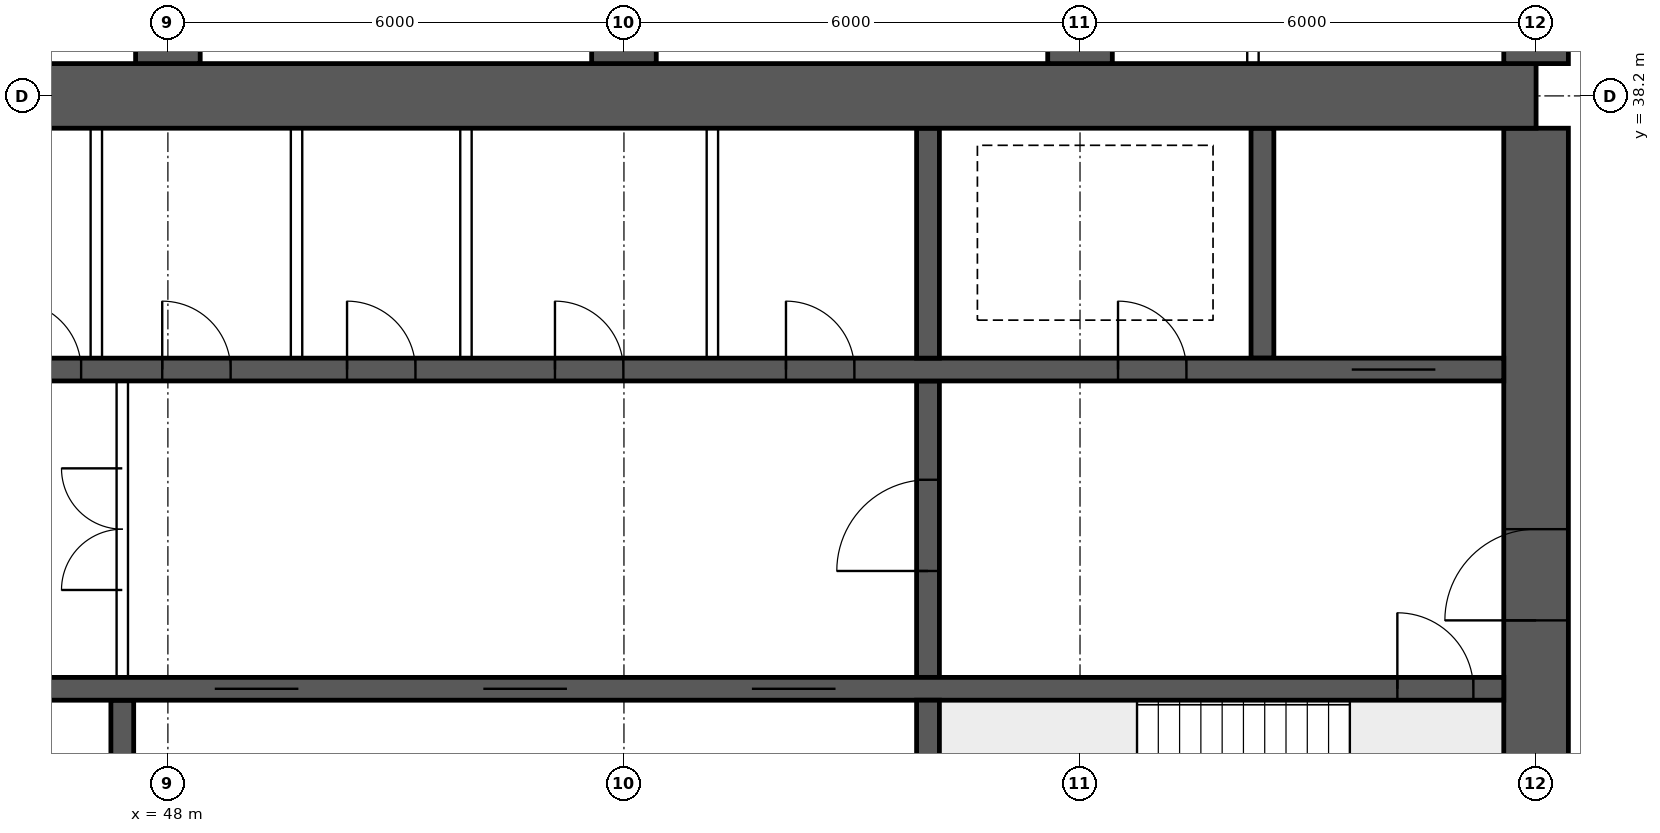
"""IFC4 building model, lengths in metres.
Left out: names, types, materials, properties, quantities, classifications, styles, units other than length and angle.
Written with IfcOpenShell. Run it as: python <this file> out.ifc"""

import sys

from ifc_helpers import new_model, si_unit, direction, frame, frame_2d, origin, place, context, subcontext, project, spatial, rectangle, extrude, element, fill, save


model = new_model("IFC4")
c1 = context("Model", 3, precision=1e-05, world=origin(), true_north=direction((0.0, 1.0)))
c2 = subcontext(c1, "Body", "Model", "MODEL_VIEW")
j1 = project(units=[si_unit("LENGTHUNIT", "METRE"), si_unit("PLANEANGLEUNIT", "RADIAN")], contexts=[c1])
p1 = place(None, origin())
s1 = spatial("IfcSite", under=j1, at=p1, CompositionType="ELEMENT")
p2 = place(p1, origin())
s2 = spatial("IfcBuilding", under=s1, at=p2, CompositionType="ELEMENT")
p3 = place(p2, frame((0.0, 0.0, 171.1)))
s3 = spatial("IfcBuildingStorey", under=s2, at=p3, CompositionType="ELEMENT", Elevation=171.1)
p4 = place(p3, frame((18.0, 38.2, 0.0), z_axis=(0.0, 0.0, 1.0), x_axis=(1.0, 0.0, 0.0)))
e1 = element("IfcWall", 1, at=p4, inside=s3, PredefinedType="SHEAR", context=c2, shape_type="SweptSolid", body=[
    extrude(rectangle(XDim=48.0, YDim=0.85, at=frame_2d((24.0, 0.0))), origin(), (0.0, 0.0, 1.0), 3.75),
])
p5 = place(p3, frame((66.0, 26.225, 0.0), z_axis=(0.0, 0.0, 1.0), x_axis=(0.0, 1.0, 0.0)))
e2 = element("IfcWall", 2, at=p5, inside=s3, PredefinedType="SHEAR", context=c2, shape_type="SweptSolid", body=[
    extrude(rectangle(XDim=11.55, YDim=0.85, at=frame_2d((5.775, 0.0))), origin(), (0.0, 0.0, 1.0), 3.75),
])
p6 = place(p5, frame((5.075, 0.0, 0.0)))
e3 = element("IfcOpeningElement", 3, at=p6, cuts=e2, PredefinedType="OPENING", context=c2, shape_type="SweptSolid", body=[
    extrude(rectangle(XDim=1.2, YDim=2.1, at=frame_2d((0.6, 1.05))), frame((0.0, 0.435, 0.0), z_axis=(0.0, -1.0, 0.0), x_axis=(1.0, 0.0, 0.0)), (0.0, 0.0, 1.0), 0.87),
])
p7 = place(p3, frame((18.425, 30.4, 0.0), z_axis=(0.0, 0.0, 1.0), x_axis=(1.0, 0.0, 0.0)))
e4 = element("IfcWall", 4, at=p7, inside=s3, PredefinedType="SHEAR", context=c2, shape_type="SweptSolid", body=[
    extrude(rectangle(XDim=47.15, YDim=0.3, at=frame_2d((23.575, 0.0))), origin(), (0.0, 0.0, 1.0), 3.75),
])
p8 = place(p7, frame((0.4, 0.0, 0.0)))
e5 = element("IfcOpeningElement", 5, at=p8, cuts=e4, PredefinedType="OPENING", context=c2, shape_type="SweptSolid", body=[
    extrude(rectangle(XDim=1.0, YDim=2.1, at=frame_2d((0.5, 1.05))), frame((0.0, 0.16, 0.0), z_axis=(0.0, -1.0, 0.0), x_axis=(1.0, 0.0, 0.0)), (0.0, 0.0, 1.0), 0.32),
])
p9 = place(p7, frame((45.75, 0.0, 0.0)))
e6 = element("IfcOpeningElement", 6, at=p9, cuts=e4, PredefinedType="OPENING", context=c2, shape_type="SweptSolid", body=[
    extrude(rectangle(XDim=1.0, YDim=2.1, at=frame_2d((0.5, 1.05))), frame((0.0, 0.16, 0.0), z_axis=(0.0, -1.0, 0.0), x_axis=(1.0, 0.0, 0.0)), (0.0, 0.0, 1.0), 0.32),
])
p10 = place(p7, frame((8.325, 0.0, 0.0)))
e7 = element("IfcOpeningElement", 7, at=p10, cuts=e4, PredefinedType="OPENING", context=c2, shape_type="SweptSolid", body=[
    extrude(rectangle(XDim=1.1, YDim=2.1, at=frame_2d((0.55, 1.05))), frame((0.0, 0.16, 0.0), z_axis=(0.0, -1.0, 0.0), x_axis=(1.0, 0.0, 0.0)), (0.0, 0.0, 1.0), 0.32),
])
p11 = place(p7, frame((10.925, 0.0, 0.0)))
e8 = element("IfcOpeningElement", 8, at=p11, cuts=e4, PredefinedType="OPENING", context=c2, shape_type="SweptSolid", body=[
    extrude(rectangle(XDim=1.1, YDim=2.1, at=frame_2d((0.55, 1.05))), frame((0.0, 0.16, 0.0), z_axis=(0.0, -1.0, 0.0), x_axis=(1.0, 0.0, 0.0)), (0.0, 0.0, 1.0), 0.32),
])
p12 = place(p7, frame((13.525, 0.0, 0.0)))
e9 = element("IfcOpeningElement", 9, at=p12, cuts=e4, PredefinedType="OPENING", context=c2, shape_type="SweptSolid", body=[
    extrude(rectangle(XDim=1.1, YDim=2.1, at=frame_2d((0.55, 1.05))), frame((0.0, 0.16, 0.0), z_axis=(0.0, -1.0, 0.0), x_axis=(1.0, 0.0, 0.0)), (0.0, 0.0, 1.0), 0.32),
])
p13 = place(p7, frame((16.125, 0.0, 0.0)))
e10 = element("IfcOpeningElement", 10, at=p13, cuts=e4, PredefinedType="OPENING", context=c2, shape_type="SweptSolid", body=[
    extrude(rectangle(XDim=1.1, YDim=2.1, at=frame_2d((0.55, 1.05))), frame((0.0, 0.16, 0.0), z_axis=(0.0, -1.0, 0.0), x_axis=(1.0, 0.0, 0.0)), (0.0, 0.0, 1.0), 0.32),
])
p14 = place(p7, frame((18.9, 0.0, 0.0)))
e11 = element("IfcOpeningElement", 11, at=p14, cuts=e4, PredefinedType="OPENING", context=c2, shape_type="SweptSolid", body=[
    extrude(rectangle(XDim=0.9, YDim=2.1, at=frame_2d((0.45, 1.05))), frame((0.0, 0.16, 0.0), z_axis=(0.0, -1.0, 0.0), x_axis=(1.0, 0.0, 0.0)), (0.0, 0.0, 1.0), 0.32),
])
p15 = place(p7, frame((30.192, 0.0, 0.0)))
e12 = element("IfcOpeningElement", 12, at=p15, cuts=e4, PredefinedType="OPENING", context=c2, shape_type="SweptSolid", body=[
    extrude(rectangle(XDim=1.1, YDim=2.1, at=frame_2d((0.55, 1.05))), frame((0.0, 0.16, 0.0), z_axis=(0.0, -1.0, 0.0), x_axis=(1.0, 0.0, 0.0)), (0.0, 0.0, 1.0), 0.32),
])
p16 = place(p7, frame((33.725, 0.0, 0.0)))
e13 = element("IfcOpeningElement", 13, at=p16, cuts=e4, PredefinedType="OPENING", context=c2, shape_type="SweptSolid", body=[
    extrude(rectangle(XDim=1.1, YDim=2.1, at=frame_2d((0.55, 1.05))), frame((0.0, 0.16, 0.0), z_axis=(0.0, -1.0, 0.0), x_axis=(1.0, 0.0, 0.0)), (0.0, 0.0, 1.0), 0.32),
])
p17 = place(p7, frame((37.258, 0.0, 0.0)))
e14 = element("IfcOpeningElement", 14, at=p17, cuts=e4, PredefinedType="OPENING", context=c2, shape_type="SweptSolid", body=[
    extrude(rectangle(XDim=1.1, YDim=2.1, at=frame_2d((0.55, 1.05))), frame((0.0, 0.16, 0.0), z_axis=(0.0, -1.0, 0.0), x_axis=(1.0, 0.0, 0.0)), (0.0, 0.0, 1.0), 0.32),
])
p18 = place(p3, frame((18.425, 34.6, 0.0), z_axis=(0.0, 0.0, 1.0), x_axis=(1.0, 0.0, 0.0)))
e15 = element("IfcWall", 15, at=p18, inside=s3, PredefinedType="SHEAR", context=c2, shape_type="SweptSolid", body=[
    extrude(rectangle(XDim=47.15, YDim=0.3, at=frame_2d((23.575, 0.0))), origin(), (0.0, 0.0, 1.0), 3.75),
])
p19 = place(p18, frame((0.9, 0.0, 0.0)))
e16 = element("IfcOpeningElement", 16, at=p19, cuts=e15, PredefinedType="OPENING", context=c2, shape_type="SweptSolid", body=[
    extrude(rectangle(XDim=1.1, YDim=2.1, at=frame_2d((0.55, 1.05))), frame((0.0, 0.16, 0.0), z_axis=(0.0, -1.0, 0.0), x_axis=(1.0, 0.0, 0.0)), (0.0, 0.0, 1.0), 0.32),
])
p20 = place(p18, frame((45.15, 0.0, 0.0)))
e17 = element("IfcOpeningElement", 17, at=p20, cuts=e15, PredefinedType="OPENING", context=c2, shape_type="SweptSolid", body=[
    extrude(rectangle(XDim=1.1, YDim=2.1, at=frame_2d((0.55, 1.05))), frame((0.0, 0.16, 0.0), z_axis=(0.0, -1.0, 0.0), x_axis=(1.0, 0.0, 0.0)), (0.0, 0.0, 1.0), 0.32),
])
p21 = place(p18, frame((4.175, 0.0, 0.0)))
e18 = element("IfcOpeningElement", 18, at=p21, cuts=e15, PredefinedType="OPENING", context=c2, shape_type="SweptSolid", body=[
    extrude(rectangle(XDim=0.9, YDim=2.1, at=frame_2d((0.45, 1.05))), frame((0.0, 0.16, 0.0), z_axis=(0.0, -1.0, 0.0), x_axis=(1.0, 0.0, 0.0)), (0.0, 0.0, 1.0), 0.32),
])
p22 = place(p18, frame((42.075, 0.0, 0.0)))
e19 = element("IfcOpeningElement", 19, at=p22, cuts=e15, PredefinedType="OPENING", context=c2, shape_type="SweptSolid", body=[
    extrude(rectangle(XDim=0.9, YDim=2.1, at=frame_2d((0.45, 1.05))), frame((0.0, 0.16, 0.0), z_axis=(0.0, -1.0, 0.0), x_axis=(1.0, 0.0, 0.0)), (0.0, 0.0, 1.0), 0.32),
])
p23 = place(p18, frame((8.95, 0.0, 0.0)))
e20 = element("IfcOpeningElement", 20, at=p23, cuts=e15, PredefinedType="OPENING", context=c2, shape_type="SweptSolid", body=[
    extrude(rectangle(XDim=0.9, YDim=2.1, at=frame_2d((0.45, 1.05))), frame((0.0, 0.16, 0.0), z_axis=(0.0, -1.0, 0.0), x_axis=(1.0, 0.0, 0.0)), (0.0, 0.0, 1.0), 0.32),
])
p24 = place(p18, frame((12.924, 0.0, 0.0)))
e21 = element("IfcOpeningElement", 21, at=p24, cuts=e15, PredefinedType="OPENING", context=c2, shape_type="SweptSolid", body=[
    extrude(rectangle(XDim=0.9, YDim=2.1, at=frame_2d((0.45, 1.05))), frame((0.0, 0.16, 0.0), z_axis=(0.0, -1.0, 0.0), x_axis=(1.0, 0.0, 0.0)), (0.0, 0.0, 1.0), 0.32),
])
p25 = place(p18, frame((16.571, 0.0, 0.0)))
e22 = element("IfcOpeningElement", 22, at=p25, cuts=e15, PredefinedType="OPENING", context=c2, shape_type="SweptSolid", body=[
    extrude(rectangle(XDim=0.9, YDim=2.1, at=frame_2d((0.45, 1.05))), frame((0.0, 0.16, 0.0), z_axis=(0.0, -1.0, 0.0), x_axis=(1.0, 0.0, 0.0)), (0.0, 0.0, 1.0), 0.32),
])
p26 = place(p18, frame((20.33, 0.0, 0.0)))
e23 = element("IfcOpeningElement", 23, at=p26, cuts=e15, PredefinedType="OPENING", context=c2, shape_type="SweptSolid", body=[
    extrude(rectangle(XDim=0.9, YDim=2.1, at=frame_2d((0.45, 1.05))), frame((0.0, 0.16, 0.0), z_axis=(0.0, -1.0, 0.0), x_axis=(1.0, 0.0, 0.0)), (0.0, 0.0, 1.0), 0.32),
])
p27 = place(p18, frame((24.736, 0.0, 0.0)))
e24 = element("IfcOpeningElement", 24, at=p27, cuts=e15, PredefinedType="OPENING", context=c2, shape_type="SweptSolid", body=[
    extrude(rectangle(XDim=0.9, YDim=2.1, at=frame_2d((0.45, 1.05))), frame((0.0, 0.16, 0.0), z_axis=(0.0, -1.0, 0.0), x_axis=(1.0, 0.0, 0.0)), (0.0, 0.0, 1.0), 0.32),
])
p28 = place(p18, frame((27.533, 0.0, 0.0)))
e25 = element("IfcOpeningElement", 25, at=p28, cuts=e15, PredefinedType="OPENING", context=c2, shape_type="SweptSolid", body=[
    extrude(rectangle(XDim=0.9, YDim=2.1, at=frame_2d((0.45, 1.05))), frame((0.0, 0.16, 0.0), z_axis=(0.0, -1.0, 0.0), x_axis=(1.0, 0.0, 0.0)), (0.0, 0.0, 1.0), 0.32),
])
p29 = place(p18, frame((29.5, 0.0, 0.0)))
e26 = element("IfcOpeningElement", 26, at=p29, cuts=e15, PredefinedType="OPENING", context=c2, shape_type="SweptSolid", body=[
    extrude(rectangle(XDim=0.9, YDim=2.1, at=frame_2d((0.45, 1.05))), frame((0.0, 0.16, 0.0), z_axis=(0.0, -1.0, 0.0), x_axis=(1.0, 0.0, 0.0)), (0.0, 0.0, 1.0), 0.32),
])
p30 = place(p18, frame((31.932, 0.0, 0.0)))
e27 = element("IfcOpeningElement", 27, at=p30, cuts=e15, PredefinedType="OPENING", context=c2, shape_type="SweptSolid", body=[
    extrude(rectangle(XDim=0.9, YDim=2.1, at=frame_2d((0.45, 1.05))), frame((0.0, 0.16, 0.0), z_axis=(0.0, -1.0, 0.0), x_axis=(1.0, 0.0, 0.0)), (0.0, 0.0, 1.0), 0.32),
])
p31 = place(p18, frame((34.667, 0.0, 0.0)))
e28 = element("IfcOpeningElement", 28, at=p31, cuts=e15, PredefinedType="OPENING", context=c2, shape_type="SweptSolid", body=[
    extrude(rectangle(XDim=0.9, YDim=2.1, at=frame_2d((0.45, 1.05))), frame((0.0, 0.16, 0.0), z_axis=(0.0, -1.0, 0.0), x_axis=(1.0, 0.0, 0.0)), (0.0, 0.0, 1.0), 0.32),
])
p32 = place(p18, frame((37.707, 0.0, 0.0)))
e29 = element("IfcOpeningElement", 29, at=p32, cuts=e15, PredefinedType="OPENING", context=c2, shape_type="SweptSolid", body=[
    extrude(rectangle(XDim=0.9, YDim=2.1, at=frame_2d((0.45, 1.05))), frame((0.0, 0.16, 0.0), z_axis=(0.0, -1.0, 0.0), x_axis=(1.0, 0.0, 0.0)), (0.0, 0.0, 1.0), 0.32),
])
p33 = place(p3, frame((58.0, 26.225, 0.0), z_axis=(0.0, 0.0, 1.0), x_axis=(0.0, 1.0, 0.0)))
e30 = element("IfcWall", 30, at=p33, inside=s3, PredefinedType="SHEAR", context=c2, shape_type="SweptSolid", body=[
    extrude(rectangle(XDim=4.025, YDim=0.3, at=frame_2d((2.012, 0.0))), origin(), (0.0, 0.0, 1.0), 3.75),
])
p34 = place(p3, frame((58.0, 30.55, 0.0), z_axis=(0.0, 0.0, 1.0), x_axis=(0.0, 1.0, 0.0)))
e31 = element("IfcWall", 31, at=p34, inside=s3, PredefinedType="SHEAR", context=c2, shape_type="SweptSolid", body=[
    extrude(rectangle(XDim=3.9, YDim=0.3, at=frame_2d((1.95, 0.0))), origin(), (0.0, 0.0, 1.0), 3.75),
])
p35 = place(p34, frame((1.4, 0.0, 0.0)))
e32 = element("IfcOpeningElement", 32, at=p35, cuts=e31, PredefinedType="OPENING", context=c2, shape_type="SweptSolid", body=[
    extrude(rectangle(XDim=1.2, YDim=2.1, at=frame_2d((0.6, 1.05))), frame((0.0, 0.16, 0.0), z_axis=(0.0, -1.0, 0.0), x_axis=(1.0, 0.0, 0.0)), (0.0, 0.0, 1.0), 0.32),
])
for number, where, z_axis, x_axis in (
    (33, (62.4, 34.75, 0.0), (0.0, 0.0, 1.0), (0.0, 1.0, 0.0)),
    (34, (58.0, 34.75, 0.0), (0.0, 0.0, 1.0), (0.0, 1.0, 0.0)),
):
    element("IfcWall", number, at=place(p3, frame(where, z_axis=z_axis, x_axis=x_axis)), inside=s3, PredefinedType="SHEAR", context=c2, shape_type="SweptSolid", body=[
        extrude(rectangle(XDim=3.025, YDim=0.3, at=frame_2d((1.512, 0.0))), origin(), (0.0, 0.0, 1.0), 3.75),
    ])
p36 = place(p3, frame((47.4, 26.225, 0.0), z_axis=(0.0, 0.0, 1.0), x_axis=(0.0, 1.0, 0.0)))
e35 = element("IfcWall", 35, at=p36, inside=s3, PredefinedType="SHEAR", context=c2, shape_type="SweptSolid", body=[
    extrude(rectangle(XDim=4.025, YDim=0.3, at=frame_2d((2.012, 0.0))), origin(), (0.0, 0.0, 1.0), 3.75),
])
for number, where, z_axis, x_axis in (
    (36, (48.0, 38.625, 0.0), (0.0, 0.0, 1.0), (0.0, 1.0, 0.0)),
    (37, (54.0, 38.625, 0.0), (0.0, 0.0, 1.0), (0.0, 1.0, 0.0)),
    (38, (60.0, 38.625, 0.0), (0.0, 0.0, 1.0), (0.0, 1.0, 0.0)),
    (39, (66.0, 38.625, 0.0), (0.0, 0.0, 1.0), (0.0, 1.0, 0.0)),
):
    element("IfcWall", number, at=place(p3, frame(where, z_axis=z_axis, x_axis=x_axis)), inside=s3, PredefinedType="SHEAR", context=c2, shape_type="SweptSolid", body=[
        extrude(rectangle(XDim=8.175, YDim=0.85, at=frame_2d((4.087, 0.0))), origin(), (0.0, 0.0, 1.0), 3.75),
    ])
p37 = place(p3, frame((47.4, 30.55, 0.0), z_axis=(0.0, 0.0, 1.0), x_axis=(0.0, 1.0, 0.0)))
e40 = element("IfcWall", 40, at=p37, inside=s3, PredefinedType="SOLIDWALL", context=c2, shape_type="SweptSolid", body=[
    extrude(rectangle(XDim=3.9, YDim=0.15, at=frame_2d((1.95, 0.0))), origin(), (0.0, 0.0, 1.0), 3.5),
])
p38 = place(p37, frame((1.15, 0.0, 0.0)))
e41 = element("IfcOpeningElement", 41, at=p38, cuts=e40, PredefinedType="OPENING", context=c2, shape_type="SweptSolid", body=[
    extrude(rectangle(XDim=1.6, YDim=2.1, at=frame_2d((0.8, 1.05))), frame((0.0, 0.085, 0.0), z_axis=(0.0, -1.0, 0.0), x_axis=(1.0, 0.0, 0.0)), (0.0, 0.0, 1.0), 0.17),
])
for number, where, z_axis, x_axis in (
    (42, (47.058, 34.75, 0.0), (0.0, 0.0, 1.0), (0.0, 1.0, 0.0)),
    (43, (49.692, 34.75, 0.0), (0.0, 0.0, 1.0), (0.0, 1.0, 0.0)),
    (44, (51.921, 34.75, 0.0), (0.0, 0.0, 1.0), (0.0, 1.0, 0.0)),
    (45, (55.163, 34.75, 0.0), (0.0, 0.0, 1.0), (0.0, 1.0, 0.0)),
):
    element("IfcWall", number, at=place(p3, frame(where, z_axis=z_axis, x_axis=x_axis)), inside=s3, PredefinedType="SOLIDWALL", context=c2, shape_type="SweptSolid", body=[
        extrude(rectangle(XDim=3.025, YDim=0.15, at=frame_2d((1.512, 0.0))), origin(), (0.0, 0.0, 1.0), 3.5),
    ])
p39 = place(p3, frame((62.275, 40.925, 0.0), z_axis=(0.0, 0.0, 1.0), x_axis=(0.0, -1.0, 0.0)))
e46 = element("IfcWall", 46, at=p39, inside=s3, PredefinedType="PARTITIONING", context=c2, shape_type="SweptSolid", body=[
    extrude(rectangle(XDim=2.3, YDim=0.15, at=frame_2d((1.15, 0.0))), origin(), (0.0, 0.0, 1.0), 3.5),
])
p40 = place(p38, origin())
e47 = element("IfcDoor", 47, at=p40, inside=s3, OperationType="DOUBLE_DOOR_SINGLE_SWING", PredefinedType="DOOR", context=c2, shape_type="SweptSolid", body=[
    extrude(rectangle(XDim=1.6, YDim=2.1, at=frame_2d((0.8, 1.05))), frame((0.0, 0.025, 0.0), z_axis=(0.0, -1.0, 0.0), x_axis=(1.0, 0.0, 0.0)), (0.0, 0.0, 1.0), 0.05),
])
fill(e41, e47)
p41 = place(p6, origin())
e48 = element("IfcDoor", 48, at=p41, inside=s3, OperationType="SINGLE_SWING_LEFT", PredefinedType="DOOR", context=c2, shape_type="SweptSolid", body=[
    extrude(rectangle(XDim=1.2, YDim=2.1, at=frame_2d((0.6, 1.05))), frame((0.0, 0.025, 0.0), z_axis=(0.0, -1.0, 0.0), x_axis=(1.0, 0.0, 0.0)), (0.0, 0.0, 1.0), 0.05),
])
fill(e3, e48)
p42 = place(p9, origin())
e49 = element("IfcDoor", 49, at=p42, inside=s3, OperationType="SINGLE_SWING_LEFT", PredefinedType="DOOR", context=c2, shape_type="SweptSolid", body=[
    extrude(rectangle(XDim=1.0, YDim=2.1, at=frame_2d((0.5, 1.05))), frame((0.0, 0.025, 0.0), z_axis=(0.0, -1.0, 0.0), x_axis=(1.0, 0.0, 0.0)), (0.0, 0.0, 1.0), 0.05),
])
fill(e6, e49)
p43 = place(p20, origin())
e50 = element("IfcDoor", 50, at=p43, inside=s3, OperationType="DOUBLE_DOOR_SLIDING", PredefinedType="DOOR", context=c2, shape_type="SweptSolid", body=[
    extrude(rectangle(XDim=1.1, YDim=2.1, at=frame_2d((0.55, 1.05))), frame((0.0, 0.025, 0.0), z_axis=(0.0, -1.0, 0.0), x_axis=(1.0, 0.0, 0.0)), (0.0, 0.0, 1.0), 0.05),
])
fill(e17, e50)
p44 = place(p22, origin())
e51 = element("IfcDoor", 51, at=p44, inside=s3, OperationType="SINGLE_SWING_LEFT", PredefinedType="DOOR", context=c2, shape_type="SweptSolid", body=[
    extrude(rectangle(XDim=0.9, YDim=2.1, at=frame_2d((0.45, 1.05))), frame((0.0, 0.025, 0.0), z_axis=(0.0, -1.0, 0.0), x_axis=(1.0, 0.0, 0.0)), (0.0, 0.0, 1.0), 0.05),
])
fill(e19, e51)
p45 = place(p35, origin())
e52 = element("IfcDoor", 52, at=p45, inside=s3, OperationType="SINGLE_SWING_LEFT", PredefinedType="DOOR", context=c2, shape_type="SweptSolid", body=[
    extrude(rectangle(XDim=1.2, YDim=2.1, at=frame_2d((0.6, 1.05))), frame((0.0, 0.025, 0.0), z_axis=(0.0, -1.0, 0.0), x_axis=(1.0, 0.0, 0.0)), (0.0, 0.0, 1.0), 0.05),
])
fill(e32, e52)
p46 = place(p28, origin())
e53 = element("IfcDoor", 53, at=p46, inside=s3, OperationType="SINGLE_SWING_LEFT", PredefinedType="DOOR", context=c2, shape_type="SweptSolid", body=[
    extrude(rectangle(XDim=0.9, YDim=2.1, at=frame_2d((0.45, 1.05))), frame((0.0, 0.025, 0.0), z_axis=(0.0, -1.0, 0.0), x_axis=(1.0, 0.0, 0.0)), (0.0, 0.0, 1.0), 0.05),
])
fill(e25, e53)
p47 = place(p29, origin())
e54 = element("IfcDoor", 54, at=p47, inside=s3, OperationType="SINGLE_SWING_LEFT", PredefinedType="DOOR", context=c2, shape_type="SweptSolid", body=[
    extrude(rectangle(XDim=0.9, YDim=2.1, at=frame_2d((0.45, 1.05))), frame((0.0, 0.025, 0.0), z_axis=(0.0, -1.0, 0.0), x_axis=(1.0, 0.0, 0.0)), (0.0, 0.0, 1.0), 0.05),
])
fill(e26, e54)
p48 = place(p30, origin())
e55 = element("IfcDoor", 55, at=p48, inside=s3, OperationType="SINGLE_SWING_LEFT", PredefinedType="DOOR", context=c2, shape_type="SweptSolid", body=[
    extrude(rectangle(XDim=0.9, YDim=2.1, at=frame_2d((0.45, 1.05))), frame((0.0, 0.025, 0.0), z_axis=(0.0, -1.0, 0.0), x_axis=(1.0, 0.0, 0.0)), (0.0, 0.0, 1.0), 0.05),
])
fill(e27, e55)
p49 = place(p31, origin())
e56 = element("IfcDoor", 56, at=p49, inside=s3, OperationType="SINGLE_SWING_LEFT", PredefinedType="DOOR", context=c2, shape_type="SweptSolid", body=[
    extrude(rectangle(XDim=0.9, YDim=2.1, at=frame_2d((0.45, 1.05))), frame((0.0, 0.025, 0.0), z_axis=(0.0, -1.0, 0.0), x_axis=(1.0, 0.0, 0.0)), (0.0, 0.0, 1.0), 0.05),
])
fill(e28, e56)
p50 = place(p32, origin())
e57 = element("IfcDoor", 57, at=p50, inside=s3, OperationType="SINGLE_SWING_LEFT", PredefinedType="DOOR", context=c2, shape_type="SweptSolid", body=[
    extrude(rectangle(XDim=0.9, YDim=2.1, at=frame_2d((0.45, 1.05))), frame((0.0, 0.025, 0.0), z_axis=(0.0, -1.0, 0.0), x_axis=(1.0, 0.0, 0.0)), (0.0, 0.0, 1.0), 0.05),
])
fill(e29, e57)
p51 = place(p15, origin())
e58 = element("IfcDoor", 58, at=p51, inside=s3, OperationType="DOUBLE_DOOR_SLIDING", PredefinedType="DOOR", context=c2, shape_type="SweptSolid", body=[
    extrude(rectangle(XDim=1.1, YDim=2.1, at=frame_2d((0.55, 1.05))), frame((0.0, 0.025, 0.0), z_axis=(0.0, -1.0, 0.0), x_axis=(1.0, 0.0, 0.0)), (0.0, 0.0, 1.0), 0.05),
])
fill(e12, e58)
p52 = place(p16, origin())
e59 = element("IfcDoor", 59, at=p52, inside=s3, OperationType="DOUBLE_DOOR_SLIDING", PredefinedType="DOOR", context=c2, shape_type="SweptSolid", body=[
    extrude(rectangle(XDim=1.1, YDim=2.1, at=frame_2d((0.55, 1.05))), frame((0.0, 0.025, 0.0), z_axis=(0.0, -1.0, 0.0), x_axis=(1.0, 0.0, 0.0)), (0.0, 0.0, 1.0), 0.05),
])
fill(e13, e59)
p53 = place(p17, origin())
e60 = element("IfcDoor", 60, at=p53, inside=s3, OperationType="DOUBLE_DOOR_SLIDING", PredefinedType="DOOR", context=c2, shape_type="SweptSolid", body=[
    extrude(rectangle(XDim=1.1, YDim=2.1, at=frame_2d((0.55, 1.05))), frame((0.0, 0.025, 0.0), z_axis=(0.0, -1.0, 0.0), x_axis=(1.0, 0.0, 0.0)), (0.0, 0.0, 1.0), 0.05),
])
fill(e14, e60)
save(model, sys.argv[1])
